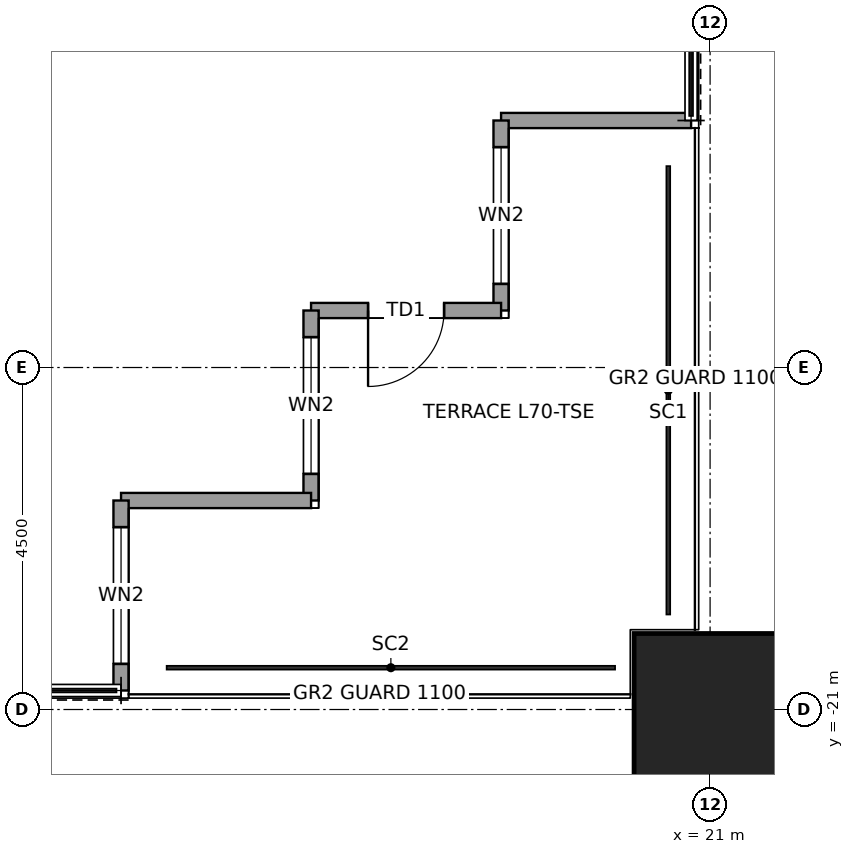
"""IFC4 building model, lengths in metres.
Left out: names, types, materials, properties, quantities, classifications, styles, units other than length and angle.
Written with IfcOpenShell. Run it as: python <this file> out.ifc"""

import sys

from ifc_helpers import new_model, si_unit, direction, frame, frame_2d, origin, origin_2d, place, context, subcontext, project, spatial, rectangle, hollow_rectangle, extrude, element, fill, save


model = new_model("IFC4")
c1 = context("Model", 3, precision=1e-05, world=origin(), true_north=direction((0.0, 1.0)))
c2 = subcontext(c1, "Body", "Model", "MODEL_VIEW")
j1 = project(units=[si_unit("LENGTHUNIT", "METRE"), si_unit("PLANEANGLEUNIT", "RADIAN")], contexts=[c1])
p1 = place(None, origin())
s1 = spatial("IfcSite", under=j1, at=p1, CompositionType="ELEMENT")
p2 = place(p1, origin())
s2 = spatial("IfcBuilding", under=s1, at=p2, CompositionType="ELEMENT")
p3 = place(p2, frame((0.0, 0.0, 315.9)))
s3 = spatial("IfcBuildingStorey", under=s2, at=p3, CompositionType="ELEMENT", Elevation=315.9)
p4 = place(p3, frame((21.0, -21.0, 0.0), z_axis=(0.0, 0.0, 1.0), x_axis=(1.0, 0.0, 0.0)))
e1 = element("IfcColumn", 1, at=p4, inside=s3, PredefinedType="COLUMN", context=c2, shape_type="SweptSolid", body=[
    extrude(hollow_rectangle(XDim=2.0, YDim=2.0, WallThickness=0.095, at=origin_2d()), origin(), (0.0, 0.0, 1.0), 4.0),
])
p5 = place(p3, frame((20.75, -13.25, 0.0), z_axis=(0.0, 0.0, 1.0), x_axis=(-1.0, 0.0, 0.0)))
e2 = element("IfcWall", 2, at=p5, inside=s3, PredefinedType="SOLIDWALL", context=c2, shape_type="SweptSolid", body=[
    extrude(rectangle(XDim=2.5, YDim=0.2, at=frame_2d((1.25, 0.0))), origin(), (0.0, 0.0, 1.0), 3.85),
])
p6 = place(p3, frame((18.25, -13.25, 0.0), z_axis=(0.0, 0.0, 1.0), x_axis=(0.0, -1.0, 0.0)))
e3 = element("IfcWall", 3, at=p6, inside=s3, PredefinedType="SOLIDWALL", context=c2, shape_type="SweptSolid", body=[
    extrude(rectangle(XDim=2.5, YDim=0.2, at=frame_2d((1.25, 0.0))), origin(), (0.0, 0.0, 1.0), 3.85),
])
p7 = place(p6, frame((0.35, 0.0, 0.3)))
e4 = element("IfcOpeningElement", 4, at=p7, cuts=e3, PredefinedType="OPENING", context=c2, shape_type="SweptSolid", body=[
    extrude(rectangle(XDim=1.8, YDim=2.4, at=frame_2d((0.9, 1.2))), frame((0.0, 0.11, 0.0), z_axis=(0.0, -1.0, 0.0), x_axis=(1.0, 0.0, 0.0)), (0.0, 0.0, 1.0), 0.22),
])
p8 = place(p3, frame((18.25, -15.75, 0.0), z_axis=(0.0, 0.0, 1.0), x_axis=(-1.0, 0.0, 0.0)))
e5 = element("IfcWall", 5, at=p8, inside=s3, PredefinedType="SOLIDWALL", context=c2, shape_type="SweptSolid", body=[
    extrude(rectangle(XDim=2.5, YDim=0.2, at=frame_2d((1.25, 0.0))), origin(), (0.0, 0.0, 1.0), 3.317),
])
p9 = place(p8, frame((0.75, 0.0, 0.0)))
e6 = element("IfcOpeningElement", 6, at=p9, cuts=e5, PredefinedType="OPENING", context=c2, shape_type="SweptSolid", body=[
    extrude(rectangle(XDim=1.0, YDim=2.4, at=frame_2d((0.5, 1.2))), frame((0.0, 0.11, 0.0), z_axis=(0.0, -1.0, 0.0), x_axis=(1.0, 0.0, 0.0)), (0.0, 0.0, 1.0), 0.22),
])
p10 = place(p3, frame((15.75, -15.75, 0.0), z_axis=(0.0, 0.0, 1.0), x_axis=(0.0, -1.0, 0.0)))
e7 = element("IfcWall", 7, at=p10, inside=s3, PredefinedType="SOLIDWALL", context=c2, shape_type="SweptSolid", body=[
    extrude(rectangle(XDim=2.5, YDim=0.2, at=frame_2d((1.25, 0.0))), origin(), (0.0, 0.0, 1.0), 3.85),
])
p11 = place(p10, frame((0.35, 0.0, 0.3)))
e8 = element("IfcOpeningElement", 8, at=p11, cuts=e7, PredefinedType="OPENING", context=c2, shape_type="SweptSolid", body=[
    extrude(rectangle(XDim=1.8, YDim=2.4, at=frame_2d((0.9, 1.2))), frame((0.0, 0.11, 0.0), z_axis=(0.0, -1.0, 0.0), x_axis=(1.0, 0.0, 0.0)), (0.0, 0.0, 1.0), 0.22),
])
p12 = place(p3, frame((15.75, -18.25, 0.0), z_axis=(0.0, 0.0, 1.0), x_axis=(-1.0, 0.0, 0.0)))
e9 = element("IfcWall", 9, at=p12, inside=s3, PredefinedType="SOLIDWALL", context=c2, shape_type="SweptSolid", body=[
    extrude(rectangle(XDim=2.5, YDim=0.2, at=frame_2d((1.25, 0.0))), origin(), (0.0, 0.0, 1.0), 3.85),
])
p13 = place(p3, frame((13.25, -18.25, 0.0), z_axis=(0.0, 0.0, 1.0), x_axis=(0.0, -1.0, 0.0)))
e10 = element("IfcWall", 10, at=p13, inside=s3, PredefinedType="SOLIDWALL", context=c2, shape_type="SweptSolid", body=[
    extrude(rectangle(XDim=2.5, YDim=0.2, at=frame_2d((1.25, 0.0))), origin(), (0.0, 0.0, 1.0), 3.85),
])
p14 = place(p13, frame((0.35, 0.0, 0.3)))
e11 = element("IfcOpeningElement", 11, at=p14, cuts=e10, PredefinedType="OPENING", context=c2, shape_type="SweptSolid", body=[
    extrude(rectangle(XDim=1.8, YDim=2.4, at=frame_2d((0.9, 1.2))), frame((0.0, 0.11, 0.0), z_axis=(0.0, -1.0, 0.0), x_axis=(1.0, 0.0, 0.0)), (0.0, 0.0, 1.0), 0.22),
])
p15 = place(p7, origin())
e12 = element("IfcWindow", 12, at=p15, inside=s3, PartitioningType="SINGLE_PANEL", PredefinedType="WINDOW", context=c2, shape_type="SweptSolid", body=[
    extrude(rectangle(XDim=1.8, YDim=2.4, at=frame_2d((0.9, 1.2))), frame((0.0, 0.03, 0.0), z_axis=(0.0, -1.0, 0.0), x_axis=(1.0, 0.0, 0.0)), (0.0, 0.0, 1.0), 0.06),
])
fill(e4, e12)
p16 = place(p9, origin())
e13 = element("IfcDoor", 13, at=p16, inside=s3, OperationType="SINGLE_SWING_RIGHT", PredefinedType="DOOR", context=c2, shape_type="SweptSolid", body=[
    extrude(rectangle(XDim=1.0, YDim=2.4, at=frame_2d((0.5, 1.2))), frame((0.0, 0.025, 0.0), z_axis=(0.0, -1.0, 0.0), x_axis=(1.0, 0.0, 0.0)), (0.0, 0.0, 1.0), 0.05),
])
fill(e6, e13)
p17 = place(p11, origin())
e14 = element("IfcWindow", 14, at=p17, inside=s3, PartitioningType="SINGLE_PANEL", PredefinedType="WINDOW", context=c2, shape_type="SweptSolid", body=[
    extrude(rectangle(XDim=1.8, YDim=2.4, at=frame_2d((0.9, 1.2))), frame((0.0, 0.03, 0.0), z_axis=(0.0, -1.0, 0.0), x_axis=(1.0, 0.0, 0.0)), (0.0, 0.0, 1.0), 0.06),
])
fill(e8, e14)
p18 = place(p14, origin())
e15 = element("IfcWindow", 15, at=p18, inside=s3, PartitioningType="SINGLE_PANEL", PredefinedType="WINDOW", context=c2, shape_type="SweptSolid", body=[
    extrude(rectangle(XDim=1.8, YDim=2.4, at=frame_2d((0.9, 1.2))), frame((0.0, 0.03, 0.0), z_axis=(0.0, -1.0, 0.0), x_axis=(1.0, 0.0, 0.0)), (0.0, 0.0, 1.0), 0.06),
])
fill(e11, e15)
save(model, sys.argv[1])
